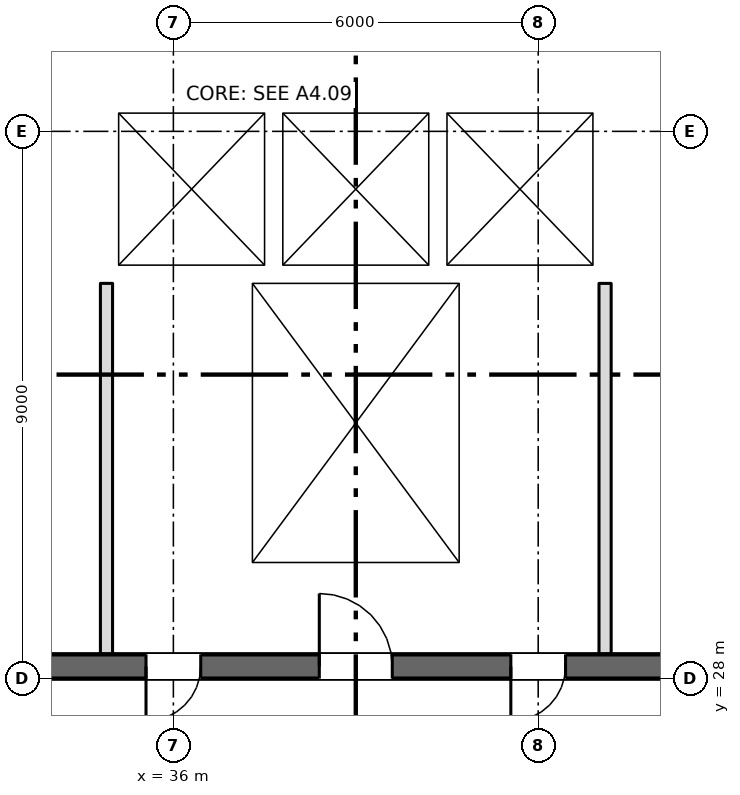
"""IFC4 building model, lengths in metres.
Left out: names, types, materials, properties, quantities, classifications, styles, units other than length and angle.
Written with IfcOpenShell. Run it as: python <this file> out.ifc"""

import sys

from ifc_helpers import new_model, si_unit, direction, frame, frame_2d, origin, place, context, subcontext, project, spatial, rectangle, extrude, element, fill, save


model = new_model("IFC4")
c1 = context("Model", 3, precision=1e-05, world=origin(), true_north=direction((0.0, 1.0)))
c2 = subcontext(c1, "Body", "Model", "MODEL_VIEW")
j1 = project(units=[si_unit("LENGTHUNIT", "METRE"), si_unit("PLANEANGLEUNIT", "RADIAN")], contexts=[c1])
p1 = place(None, origin())
s1 = spatial("IfcSite", under=j1, at=p1, CompositionType="ELEMENT")
p2 = place(p1, origin())
s2 = spatial("IfcBuilding", under=s1, at=p2, CompositionType="ELEMENT")
p3 = place(p2, frame((0.0, 0.0, 45.0)))
s3 = spatial("IfcBuildingStorey", under=s2, at=p3, CompositionType="ELEMENT", Elevation=45.0)
p4 = place(p3, frame((6.7, 28.2, 0.0), z_axis=(0.0, 0.0, 1.0), x_axis=(1.0, 0.0, 0.0)))
e1 = element("IfcWall", 1, at=p4, inside=s3, PredefinedType="SHEAR", context=c2, shape_type="SweptSolid", body=[
    extrude(rectangle(XDim=57.8, YDim=0.4, at=frame_2d((28.9, 0.0))), origin(), (0.0, 0.0, 1.0), 3.35),
])
p5 = place(p4, frame((12.812, 0.0, 0.0)))
e2 = element("IfcOpeningElement", 2, at=p5, cuts=e1, PredefinedType="OPENING", context=c2, shape_type="SweptSolid", body=[
    extrude(rectangle(XDim=0.9, YDim=2.1, at=frame_2d((0.45, 1.05))), frame((0.0, 0.21, 0.0), z_axis=(0.0, -1.0, 0.0), x_axis=(1.0, 0.0, 0.0)), (0.0, 0.0, 1.0), 0.42),
])
p6 = place(p4, frame((15.387, 0.0, 0.0)))
e3 = element("IfcOpeningElement", 3, at=p6, cuts=e1, PredefinedType="OPENING", context=c2, shape_type="SweptSolid", body=[
    extrude(rectangle(XDim=0.9, YDim=2.1, at=frame_2d((0.45, 1.05))), frame((0.0, 0.21, 0.0), z_axis=(0.0, -1.0, 0.0), x_axis=(1.0, 0.0, 0.0)), (0.0, 0.0, 1.0), 0.42),
])
p7 = place(p4, frame((48.312, 0.0, 0.0)))
e4 = element("IfcOpeningElement", 4, at=p7, cuts=e1, PredefinedType="OPENING", context=c2, shape_type="SweptSolid", body=[
    extrude(rectangle(XDim=0.9, YDim=2.1, at=frame_2d((0.45, 1.05))), frame((0.0, 0.21, 0.0), z_axis=(0.0, -1.0, 0.0), x_axis=(1.0, 0.0, 0.0)), (0.0, 0.0, 1.0), 0.42),
])
p8 = place(p4, frame((50.887, 0.0, 0.0)))
e5 = element("IfcOpeningElement", 5, at=p8, cuts=e1, PredefinedType="OPENING", context=c2, shape_type="SweptSolid", body=[
    extrude(rectangle(XDim=0.9, YDim=2.1, at=frame_2d((0.45, 1.05))), frame((0.0, 0.21, 0.0), z_axis=(0.0, -1.0, 0.0), x_axis=(1.0, 0.0, 0.0)), (0.0, 0.0, 1.0), 0.42),
])
p9 = place(p4, frame((0.562, 0.0, 0.0)))
e6 = element("IfcOpeningElement", 6, at=p9, cuts=e1, PredefinedType="OPENING", context=c2, shape_type="SweptSolid", body=[
    extrude(rectangle(XDim=0.9, YDim=2.1, at=frame_2d((0.45, 1.05))), frame((0.0, 0.21, 0.0), z_axis=(0.0, -1.0, 0.0), x_axis=(1.0, 0.0, 0.0)), (0.0, 0.0, 1.0), 0.42),
])
p10 = place(p4, frame((2.137, 0.0, 0.0)))
e7 = element("IfcOpeningElement", 7, at=p10, cuts=e1, PredefinedType="OPENING", context=c2, shape_type="SweptSolid", body=[
    extrude(rectangle(XDim=0.9, YDim=2.1, at=frame_2d((0.45, 1.05))), frame((0.0, 0.21, 0.0), z_axis=(0.0, -1.0, 0.0), x_axis=(1.0, 0.0, 0.0)), (0.0, 0.0, 1.0), 0.42),
])
p11 = place(p4, frame((4.7, 0.0, 0.0)))
e8 = element("IfcOpeningElement", 8, at=p11, cuts=e1, PredefinedType="OPENING", context=c2, shape_type="SweptSolid", body=[
    extrude(rectangle(XDim=1.2, YDim=2.1, at=frame_2d((0.6, 1.05))), frame((0.0, 0.21, 0.0), z_axis=(0.0, -1.0, 0.0), x_axis=(1.0, 0.0, 0.0)), (0.0, 0.0, 1.0), 0.42),
])
p12 = place(p4, frame((31.7, 0.0, 0.0)))
e9 = element("IfcOpeningElement", 9, at=p12, cuts=e1, PredefinedType="OPENING", context=c2, shape_type="SweptSolid", body=[
    extrude(rectangle(XDim=1.2, YDim=2.1, at=frame_2d((0.6, 1.05))), frame((0.0, 0.21, 0.0), z_axis=(0.0, -1.0, 0.0), x_axis=(1.0, 0.0, 0.0)), (0.0, 0.0, 1.0), 0.42),
])
p13 = place(p4, frame((55.2, 0.0, 0.0)))
e10 = element("IfcOpeningElement", 10, at=p13, cuts=e1, PredefinedType="OPENING", context=c2, shape_type="SweptSolid", body=[
    extrude(rectangle(XDim=1.2, YDim=2.1, at=frame_2d((0.6, 1.05))), frame((0.0, 0.21, 0.0), z_axis=(0.0, -1.0, 0.0), x_axis=(1.0, 0.0, 0.0)), (0.0, 0.0, 1.0), 0.42),
])
p14 = place(p4, frame((21.7, 0.0, 0.0)))
e11 = element("IfcOpeningElement", 11, at=p14, cuts=e1, PredefinedType="OPENING", context=c2, shape_type="SweptSolid", body=[
    extrude(rectangle(XDim=1.2, YDim=2.1, at=frame_2d((0.6, 1.05))), frame((0.0, 0.21, 0.0), z_axis=(0.0, -1.0, 0.0), x_axis=(1.0, 0.0, 0.0)), (0.0, 0.0, 1.0), 0.42),
])
p15 = place(p4, frame((41.7, 0.0, 0.0)))
e12 = element("IfcOpeningElement", 12, at=p15, cuts=e1, PredefinedType="OPENING", context=c2, shape_type="SweptSolid", body=[
    extrude(rectangle(XDim=1.2, YDim=2.1, at=frame_2d((0.6, 1.05))), frame((0.0, 0.21, 0.0), z_axis=(0.0, -1.0, 0.0), x_axis=(1.0, 0.0, 0.0)), (0.0, 0.0, 1.0), 0.42),
])
p16 = place(p4, frame((24.85, 0.0, 0.0)))
e13 = element("IfcOpeningElement", 13, at=p16, cuts=e1, PredefinedType="OPENING", context=c2, shape_type="SweptSolid", body=[
    extrude(rectangle(XDim=2.4, YDim=2.1, at=frame_2d((1.2, 1.05))), frame((0.0, 0.21, 0.0), z_axis=(0.0, -1.0, 0.0), x_axis=(1.0, 0.0, 0.0)), (0.0, 0.0, 1.0), 0.42),
])
p17 = place(p4, frame((37.35, 0.0, 0.0)))
e14 = element("IfcOpeningElement", 14, at=p17, cuts=e1, PredefinedType="OPENING", context=c2, shape_type="SweptSolid", body=[
    extrude(rectangle(XDim=2.4, YDim=2.1, at=frame_2d((1.2, 1.05))), frame((0.0, 0.21, 0.0), z_axis=(0.0, -1.0, 0.0), x_axis=(1.0, 0.0, 0.0)), (0.0, 0.0, 1.0), 0.42),
])
p18 = place(p4, frame((7.85, 0.0, 0.0)))
e15 = element("IfcOpeningElement", 15, at=p18, cuts=e1, PredefinedType="OPENING", context=c2, shape_type="SweptSolid", body=[
    extrude(rectangle(XDim=2.4, YDim=2.1, at=frame_2d((1.2, 1.05))), frame((0.0, 0.21, 0.0), z_axis=(0.0, -1.0, 0.0), x_axis=(1.0, 0.0, 0.0)), (0.0, 0.0, 1.0), 0.42),
])
p19 = place(p4, frame((28.85, 0.0, 0.0)))
e16 = element("IfcOpeningElement", 16, at=p19, cuts=e1, PredefinedType="OPENING", context=c2, shape_type="SweptSolid", body=[
    extrude(rectangle(XDim=0.9, YDim=2.1, at=frame_2d((0.45, 1.05))), frame((0.0, 0.21, 0.0), z_axis=(0.0, -1.0, 0.0), x_axis=(1.0, 0.0, 0.0)), (0.0, 0.0, 1.0), 0.42),
])
p20 = place(p4, frame((34.85, 0.0, 0.0)))
e17 = element("IfcOpeningElement", 17, at=p20, cuts=e1, PredefinedType="OPENING", context=c2, shape_type="SweptSolid", body=[
    extrude(rectangle(XDim=0.9, YDim=2.1, at=frame_2d((0.45, 1.05))), frame((0.0, 0.21, 0.0), z_axis=(0.0, -1.0, 0.0), x_axis=(1.0, 0.0, 0.0)), (0.0, 0.0, 1.0), 0.42),
])
for number, where, z_axis, x_axis in (
    (18, (37.15, 28.4, 0.0), (0.0, 0.0, 1.0), (0.0, 1.0, 0.0)),
    (19, (40.85, 28.4, 0.0), (0.0, 0.0, 1.0), (0.0, 1.0, 0.0)),
):
    element("IfcWall", number, at=place(p3, frame(where, z_axis=z_axis, x_axis=x_axis)), inside=s3, PredefinedType="SHEAR", context=c2, shape_type="SweptSolid", body=[
        extrude(rectangle(XDim=6.1, YDim=0.3, at=frame_2d((3.05, 0.0))), origin(), (0.0, 0.0, 1.0), 3.35),
    ])
p21 = place(p3, frame((34.8, 34.65, 0.0), z_axis=(0.0, 0.0, 1.0), x_axis=(1.0, 0.0, 0.0)))
e20 = element("IfcWall", 20, at=p21, inside=s3, PredefinedType="SHEAR", context=c2, shape_type="SweptSolid", body=[
    extrude(rectangle(XDim=8.4, YDim=0.3, at=frame_2d((4.2, 0.0))), origin(), (0.0, 0.0, 1.0), 3.35),
])
p22 = place(p3, frame((34.8, 37.45, 0.0), z_axis=(0.0, 0.0, 1.0), x_axis=(1.0, 0.0, 0.0)))
e21 = element("IfcWall", 21, at=p22, inside=s3, PredefinedType="SHEAR", context=c2, shape_type="SweptSolid", body=[
    extrude(rectangle(XDim=8.4, YDim=0.3, at=frame_2d((4.2, 0.0))), origin(), (0.0, 0.0, 1.0), 3.35),
])
p23 = place(p22, frame((0.95, 0.0, 0.0)))
e22 = element("IfcOpeningElement", 22, at=p23, cuts=e21, PredefinedType="OPENING", context=c2, shape_type="SweptSolid", body=[
    extrude(rectangle(XDim=1.1, YDim=2.1, at=frame_2d((0.55, 1.05))), frame((0.0, 0.16, 0.0), z_axis=(0.0, -1.0, 0.0), x_axis=(1.0, 0.0, 0.0)), (0.0, 0.0, 1.0), 0.32),
])
p24 = place(p22, frame((3.65, 0.0, 0.0)))
e23 = element("IfcOpeningElement", 23, at=p24, cuts=e21, PredefinedType="OPENING", context=c2, shape_type="SweptSolid", body=[
    extrude(rectangle(XDim=1.1, YDim=2.1, at=frame_2d((0.55, 1.05))), frame((0.0, 0.16, 0.0), z_axis=(0.0, -1.0, 0.0), x_axis=(1.0, 0.0, 0.0)), (0.0, 0.0, 1.0), 0.32),
])
p25 = place(p22, frame((6.35, 0.0, 0.0)))
e24 = element("IfcOpeningElement", 24, at=p25, cuts=e21, PredefinedType="OPENING", context=c2, shape_type="SweptSolid", body=[
    extrude(rectangle(XDim=1.1, YDim=2.1, at=frame_2d((0.55, 1.05))), frame((0.0, 0.16, 0.0), z_axis=(0.0, -1.0, 0.0), x_axis=(1.0, 0.0, 0.0)), (0.0, 0.0, 1.0), 0.32),
])
for number, where, z_axis, x_axis in (
    (25, (34.95, 34.8, 0.0), (0.0, 0.0, 1.0), (0.0, 1.0, 0.0)),
    (26, (43.05, 34.8, 0.0), (0.0, 0.0, 1.0), (0.0, 1.0, 0.0)),
    (27, (37.65, 34.8, 0.0), (0.0, 0.0, 1.0), (0.0, 1.0, 0.0)),
    (28, (40.35, 34.8, 0.0), (0.0, 0.0, 1.0), (0.0, 1.0, 0.0)),
):
    element("IfcWall", number, at=place(p3, frame(where, z_axis=z_axis, x_axis=x_axis)), inside=s3, PredefinedType="SHEAR", context=c2, shape_type="SweptSolid", body=[
        extrude(rectangle(XDim=2.5, YDim=0.3, at=frame_2d((1.25, 0.0))), origin(), (0.0, 0.0, 1.0), 3.35),
    ])
for number, where, z_axis, x_axis in (
    (29, (34.9, 28.4, 0.0), (0.0, 0.0, 1.0), (0.0, 1.0, 0.0)),
    (30, (43.1, 28.4, 0.0), (0.0, 0.0, 1.0), (0.0, 1.0, 0.0)),
):
    element("IfcWall", number, at=place(p3, frame(where, z_axis=z_axis, x_axis=x_axis)), inside=s3, PredefinedType="PARTITIONING", context=c2, shape_type="SweptSolid", body=[
        extrude(rectangle(XDim=6.1, YDim=0.2, at=frame_2d((3.05, 0.0))), origin(), (0.0, 0.0, 1.0), 3.35),
    ])
p26 = place(p23, origin())
e31 = element("IfcDoor", 31, at=p26, inside=s3, OperationType="SLIDING_TO_LEFT", PredefinedType="DOOR", context=c2, shape_type="SweptSolid", body=[
    extrude(rectangle(XDim=1.1, YDim=2.1, at=frame_2d((0.55, 1.05))), frame((0.0, 0.025, 0.0), z_axis=(0.0, -1.0, 0.0), x_axis=(1.0, 0.0, 0.0)), (0.0, 0.0, 1.0), 0.05),
])
fill(e22, e31)
p27 = place(p24, origin())
e32 = element("IfcDoor", 32, at=p27, inside=s3, OperationType="SLIDING_TO_LEFT", PredefinedType="DOOR", context=c2, shape_type="SweptSolid", body=[
    extrude(rectangle(XDim=1.1, YDim=2.1, at=frame_2d((0.55, 1.05))), frame((0.0, 0.025, 0.0), z_axis=(0.0, -1.0, 0.0), x_axis=(1.0, 0.0, 0.0)), (0.0, 0.0, 1.0), 0.05),
])
fill(e23, e32)
p28 = place(p25, origin())
e33 = element("IfcDoor", 33, at=p28, inside=s3, OperationType="SLIDING_TO_LEFT", PredefinedType="DOOR", context=c2, shape_type="SweptSolid", body=[
    extrude(rectangle(XDim=1.1, YDim=2.1, at=frame_2d((0.55, 1.05))), frame((0.0, 0.025, 0.0), z_axis=(0.0, -1.0, 0.0), x_axis=(1.0, 0.0, 0.0)), (0.0, 0.0, 1.0), 0.05),
])
fill(e24, e33)
p29 = place(p12, origin())
e34 = element("IfcDoor", 34, at=p29, inside=s3, OperationType="SINGLE_SWING_LEFT", PredefinedType="DOOR", context=c2, shape_type="SweptSolid", body=[
    extrude(rectangle(XDim=1.2, YDim=2.1, at=frame_2d((0.6, 1.05))), frame((0.0, 0.025, 0.0), z_axis=(0.0, -1.0, 0.0), x_axis=(1.0, 0.0, 0.0)), (0.0, 0.0, 1.0), 0.05),
])
fill(e9, e34)
p30 = place(p19, origin())
e35 = element("IfcDoor", 35, at=p30, inside=s3, OperationType="SINGLE_SWING_LEFT", PredefinedType="DOOR", context=c2, shape_type="SweptSolid", body=[
    extrude(rectangle(XDim=0.9, YDim=2.1, at=frame_2d((0.45, 1.05))), frame((0.0, 0.025, 0.0), z_axis=(0.0, -1.0, 0.0), x_axis=(1.0, 0.0, 0.0)), (0.0, 0.0, 1.0), 0.05),
])
fill(e16, e35)
p31 = place(p20, origin())
e36 = element("IfcDoor", 36, at=p31, inside=s3, OperationType="SINGLE_SWING_LEFT", PredefinedType="DOOR", context=c2, shape_type="SweptSolid", body=[
    extrude(rectangle(XDim=0.9, YDim=2.1, at=frame_2d((0.45, 1.05))), frame((0.0, 0.025, 0.0), z_axis=(0.0, -1.0, 0.0), x_axis=(1.0, 0.0, 0.0)), (0.0, 0.0, 1.0), 0.05),
])
fill(e17, e36)
save(model, sys.argv[1])
